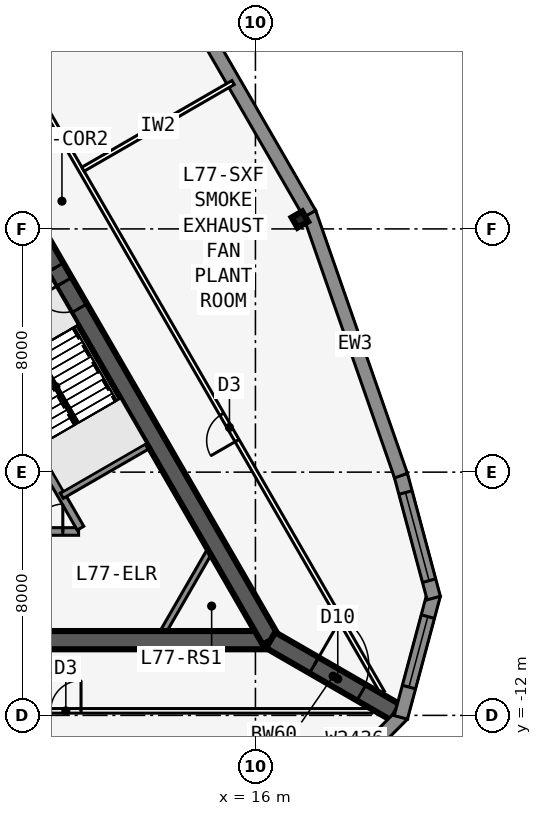
"""IFC4 building model, lengths in metres.
Left out: names, types, materials, properties, quantities, classifications, styles, units other than length and angle.
Written with IfcOpenShell. Run it as: python <this file> out.ifc"""

import sys

from ifc_helpers import new_model, si_unit, direction, frame, frame_2d, origin, origin_2d, place, context, subcontext, project, spatial, polyline, rectangle, i_section, outline, extrude, element, fill, save


model = new_model("IFC4")
c1 = context("Model", 3, precision=1e-05, world=origin(), true_north=direction((0.0, 1.0)))
c2 = subcontext(c1, "Body", "Model", "MODEL_VIEW")
j1 = project(units=[si_unit("LENGTHUNIT", "METRE"), si_unit("PLANEANGLEUNIT", "RADIAN")], contexts=[c1])
p1 = place(None, origin())
s1 = spatial("IfcSite", under=j1, at=p1, CompositionType="ELEMENT")
p2 = place(p1, origin())
s2 = spatial("IfcBuilding", under=s1, at=p2, CompositionType="ELEMENT")
p3 = place(p2, frame((0.0, 0.0, 297.8)))
s3 = spatial("IfcBuildingStorey", under=s2, at=p3, CompositionType="ELEMENT", Elevation=297.8)
p4 = place(p3, frame((-16.5, -9.526, 0.0), z_axis=(0.0, 0.0, 1.0), x_axis=(1.0, 0.0, 0.0)))
e1 = element("IfcWall", 1, at=p4, inside=s3, PredefinedType="SHEAR", context=c2, shape_type="SweptSolid", body=[
    extrude(rectangle(XDim=33.0, YDim=0.6, at=frame_2d((16.5, 0.0))), origin(), (0.0, 0.0, 1.0), 6.0),
])
p5 = place(p4, frame((14.05, 0.0, 0.0)))
e2 = element("IfcOpeningElement", 2, at=p5, cuts=e1, PredefinedType="OPENING", context=c2, shape_type="SweptSolid", body=[
    extrude(rectangle(XDim=1.8, YDim=2.13, at=frame_2d((0.9, 1.065))), frame((0.0, 0.31, 0.0), z_axis=(0.0, -1.0, 0.0), x_axis=(1.0, 0.0, 0.0)), (0.0, 0.0, 1.0), 0.62),
])
p6 = place(p3, frame((-0.55, -5.951, 0.0), z_axis=(0.0, 0.0, 1.0), x_axis=(1.0, 0.0, 0.0)))
e3 = element("IfcWall", 3, at=p6, inside=s3, PredefinedType="SOLIDWALL", context=c2, shape_type="SweptSolid", body=[
    extrude(rectangle(XDim=10.733, YDim=0.25, at=frame_2d((5.366, 0.0))), origin(), (0.0, 0.0, 1.0), 5.75),
])
p7 = place(p6, frame((9.314, 0.0, 0.0)))
e4 = element("IfcOpeningElement", 4, at=p7, cuts=e3, PredefinedType="OPENING", context=c2, shape_type="SweptSolid", body=[
    extrude(rectangle(XDim=0.9, YDim=2.13, at=frame_2d((0.45, 1.065))), frame((0.0, 0.135, 0.0), z_axis=(0.0, -1.0, 0.0), x_axis=(1.0, 0.0, 0.0)), (0.0, 0.0, 1.0), 0.27),
])
p8 = place(p6, frame((1.05, 0.0, 0.0)))
e5 = element("IfcOpeningElement", 5, at=p8, cuts=e3, PredefinedType="OPENING", context=c2, shape_type="SweptSolid", body=[
    extrude(rectangle(XDim=1.1, YDim=2.13, at=frame_2d((0.55, 1.065))), frame((0.0, 0.135, 0.0), z_axis=(0.0, -1.0, 0.0), x_axis=(1.0, 0.0, 0.0)), (0.0, 0.0, 1.0), 0.27),
])
p9 = place(p6, frame((4.05, 0.0, 0.0)))
e6 = element("IfcOpeningElement", 6, at=p9, cuts=e3, PredefinedType="OPENING", context=c2, shape_type="SweptSolid", body=[
    extrude(rectangle(XDim=1.1, YDim=2.13, at=frame_2d((0.55, 1.065))), frame((0.0, 0.135, 0.0), z_axis=(0.0, -1.0, 0.0), x_axis=(1.0, 0.0, 0.0)), (0.0, 0.0, 1.0), 0.27),
])
p10 = place(p3, frame((16.5, -9.526, 0.0), z_axis=(0.0, 0.0, 1.0), x_axis=(-0.499999749417, 0.866025548458, 0.0)))
e7 = element("IfcWall", 7, at=p10, inside=s3, PredefinedType="SHEAR", context=c2, shape_type="SweptSolid", body=[
    extrude(rectangle(XDim=33.0, YDim=0.6, at=frame_2d((16.5, 0.0))), origin(), (0.0, 0.0, 1.0), 6.0),
])
p11 = place(p10, frame((14.15, 0.0, 0.0)))
e8 = element("IfcOpeningElement", 8, at=p11, cuts=e7, PredefinedType="OPENING", context=c2, shape_type="SweptSolid", body=[
    extrude(rectangle(XDim=1.8, YDim=2.13, at=frame_2d((0.9, 1.065))), frame((0.0, 0.31, 0.0), z_axis=(0.0, -1.0, 0.0), x_axis=(1.0, 0.0, 0.0)), (0.0, 0.0, 1.0), 0.62),
])
p12 = place(p10, frame((12.6, 0.0, 0.0)))
e9 = element("IfcOpeningElement", 9, at=p12, cuts=e7, PredefinedType="OPENING", context=c2, shape_type="SweptSolid", body=[
    extrude(rectangle(XDim=1.0, YDim=2.13, at=frame_2d((0.5, 1.065))), frame((0.0, 0.31, 0.0), z_axis=(0.0, -1.0, 0.0), x_axis=(1.0, 0.0, 0.0)), (0.0, 0.0, 1.0), 0.62),
])
p13 = place(p3, frame((10.245, -5.843, 0.0), z_axis=(0.0, 0.0, 1.0), x_axis=(-0.499993009313, 0.866029439822, 0.0)))
e10 = element("IfcWall", 10, at=p13, inside=s3, PredefinedType="SOLIDWALL", context=c2, shape_type="SweptSolid", body=[
    extrude(rectangle(XDim=7.733, YDim=0.25, at=frame_2d((3.866, 0.0))), origin(), (0.0, 0.0, 1.0), 5.75),
])
p14 = place(p3, frame((9.629, -4.775, 0.0), z_axis=(0.0, 0.0, 1.0), x_axis=(0.865995643347, 0.500051543047, 0.0)))
e11 = element("IfcWall", 11, at=p14, inside=s3, PredefinedType="SOLIDWALL", context=c2, shape_type="SweptSolid", body=[
    extrude(rectangle(XDim=3.275, YDim=0.2, at=frame_2d((1.638, 0.0))), origin(), (0.0, 0.0, 1.0), 5.75),
])
p15 = place(p3, frame((16.5, -9.526, 0.0), z_axis=(0.0, 0.0, 1.0), x_axis=(0.866031398331, -0.499989616998, 0.0)))
e12 = element("IfcWall", 12, at=p15, inside=s3, PredefinedType="SHEAR", context=c2, shape_type="SweptSolid", body=[
    extrude(rectangle(XDim=4.746, YDim=0.6, at=frame_2d((2.373, 0.0))), origin(), (0.0, 0.0, 1.0), 6.0),
])
p16 = place(p15, frame((1.65, 0.0, 0.0)))
e13 = element("IfcOpeningElement", 13, at=p16, cuts=e12, PredefinedType="OPENING", context=c2, shape_type="SweptSolid", body=[
    extrude(rectangle(XDim=1.8, YDim=2.13, at=frame_2d((0.9, 1.065))), frame((0.0, 0.31, 0.0), z_axis=(0.0, -1.0, 0.0), x_axis=(1.0, 0.0, 0.0)), (0.0, 0.0, 1.0), 0.62),
])
p17 = place(p3, frame((17.461, 4.308, 0.0), z_axis=(0.0, 0.0, 1.0), x_axis=(0.866025403784, 0.5, 0.0)))
e14 = element("IfcColumn", 14, at=p17, inside=s3, PredefinedType="COLUMN", context=c2, shape_type="SweptSolid", body=[
    extrude(i_section(OverallWidth=0.399, OverallDepth=0.386, WebThickness=0.021, FlangeThickness=0.033, at=origin_2d()), origin(), (0.0, 0.0, 1.0), 6.0),
])
p18 = place(p3, frame((17.882, -14.924, 0.0), z_axis=(0.0, 0.0, 1.0), x_axis=(0.707106781187, 0.707106781187, 0.0)))
e15 = element("IfcWall", 15, at=p18, inside=s3, PredefinedType="SOLIDWALL", context=c2, shape_type="SweptSolid", body=[
    extrude(outline(polyline([(4.184, 0.225), (4.125, 0.225), (3.778, 0.132), (3.753, 0.225), (0.0, 0.225), (0.0, -0.225), (4.184, -0.225), (4.184, 0.225)])), origin(), (0.0, 0.0, 1.0), 5.75),
])
p19 = place(p18, frame((0.751, 0.0, 0.9)))
e16 = element("IfcOpeningElement", 16, at=p19, cuts=e15, PredefinedType="OPENING", context=c2, shape_type="SweptSolid", body=[
    extrude(rectangle(XDim=2.4, YDim=3.6, at=frame_2d((1.2, 1.8))), frame((0.0, 0.235, 0.0), z_axis=(0.0, -1.0, 0.0), x_axis=(1.0, 0.0, 0.0)), (0.0, 0.0, 1.0), 0.47),
])
p20 = place(p3, frame((20.783, -12.066, 0.0), z_axis=(0.0, 0.0, 1.0), x_axis=(0.258784695888, 0.965935029479, 0.0)))
e17 = element("IfcWall", 17, at=p20, inside=s3, PredefinedType="SOLIDWALL", context=c2, shape_type="SweptSolid", body=[
    extrude(outline(polyline([(4.184, 0.225), (0.431, 0.225), (0.406, 0.132), (0.06, 0.225), (0.0, 0.225), (0.0, -0.225), (4.184, -0.225), (4.184, 0.225)])), origin(), (0.0, 0.0, 1.0), 5.75),
])
p21 = place(p20, frame((1.033, 0.0, 0.9)))
e18 = element("IfcOpeningElement", 18, at=p21, cuts=e17, PredefinedType="OPENING", context=c2, shape_type="SweptSolid", body=[
    extrude(rectangle(XDim=2.4, YDim=3.6, at=frame_2d((1.2, 1.8))), frame((0.0, 0.235, 0.0), z_axis=(0.0, -1.0, 0.0), x_axis=(1.0, 0.0, 0.0)), (0.0, 0.0, 1.0), 0.47),
])
p22 = place(p3, frame((21.865, -8.141, 0.0), z_axis=(0.0, 0.0, 1.0), x_axis=(-0.258784695888, 0.965935029479, 0.0)))
e19 = element("IfcWall", 19, at=p22, inside=s3, PredefinedType="SOLIDWALL", context=c2, shape_type="SweptSolid", body=[
    extrude(rectangle(XDim=4.184, YDim=0.45, at=frame_2d((2.092, 0.0))), origin(), (0.0, 0.0, 1.0), 5.75),
])
p23 = place(p22, frame((0.592, 0.0, 0.9)))
e20 = element("IfcOpeningElement", 20, at=p23, cuts=e19, PredefinedType="OPENING", context=c2, shape_type="SweptSolid", body=[
    extrude(rectangle(XDim=3.0, YDim=3.6, at=frame_2d((1.5, 1.8))), frame((0.0, 0.235, 0.0), z_axis=(0.0, -1.0, 0.0), x_axis=(1.0, 0.0, 0.0)), (0.0, 0.0, 1.0), 0.47),
])
p24 = place(p3, frame((20.788, -4.116, 0.0), z_axis=(0.0, 0.0, 1.0), x_axis=(-0.329547852357, 0.944138873793, 0.0)))
e21 = element("IfcWall", 21, at=p24, inside=s3, PredefinedType="SOLIDWALL", context=c2, shape_type="SweptSolid", body=[
    extrude(outline(polyline([(0.0, 0.0), (9.161, 0.0), (9.161, 5.75), (0.0, 5.75), (0.0, 0.0)]), holes=[polyline([(6.831, 2.875), (6.754, 3.457), (6.529, 4.0), (6.171, 4.466), (5.706, 4.823), (5.163, 5.048), (4.581, 5.125), (3.998, 5.048), (3.456, 4.823), (2.99, 4.466), (2.632, 4.0), (2.407, 3.457), (2.331, 2.875), (2.407, 2.293), (2.632, 1.75), (2.99, 1.284), (3.456, 0.926), (3.998, 0.702), (4.581, 0.625), (5.163, 0.702), (5.706, 0.926), (6.171, 1.284), (6.529, 1.75), (6.754, 2.293), (6.831, 2.875)])]), frame((0.0, 0.225, 0.0), z_axis=(0.0, -1.0, 0.0), x_axis=(1.0, 0.0, 0.0)), (0.0, 0.0, 1.0), 0.45),
])
p25 = place(p3, frame((17.786, 4.495, 0.0), z_axis=(0.0, 0.0, 1.0), x_axis=(-0.500004234368, 0.866022959057, 0.0)))
e22 = element("IfcWall", 22, at=p25, inside=s3, PredefinedType="SOLIDWALL", context=c2, shape_type="SweptSolid", body=[
    extrude(outline(polyline([(0.0, 0.0), (10.0, 0.0), (10.0, 5.75), (0.0, 5.75), (0.0, 0.0)]), holes=[polyline([(7.25, 2.875), (7.173, 3.457), (6.948, 4.0), (6.591, 4.466), (6.125, 4.823), (5.582, 5.048), (5.0, 5.125), (4.417, 5.048), (3.875, 4.823), (3.409, 4.466), (3.052, 4.0), (2.827, 3.457), (2.75, 2.875), (2.827, 2.293), (3.052, 1.75), (3.409, 1.284), (3.875, 0.926), (4.417, 0.702), (5.0, 0.625), (5.582, 0.702), (6.125, 0.926), (6.591, 1.284), (6.948, 1.75), (7.173, 2.293), (7.25, 2.875)])]), frame((0.0, 0.225, 0.0), z_axis=(0.0, -1.0, 0.0), x_axis=(1.0, 0.0, 0.0)), (0.0, 0.0, 1.0), 0.45),
])
p26 = place(p3, frame((-19.827, -11.851, 0.0), z_axis=(0.0, 0.0, 1.0), x_axis=(1.0, 0.0, 0.0)))
e23 = element("IfcWall", 23, at=p26, inside=s3, PredefinedType="PARTITIONING", context=c2, shape_type="SweptSolid", body=[
    extrude(rectangle(XDim=39.654, YDim=0.15, at=frame_2d((19.827, 0.0))), origin(), (0.0, 0.0, 1.0), 5.75),
])
p27 = place(p26, frame((9.563, 0.0, 0.0)))
e24 = element("IfcOpeningElement", 24, at=p27, cuts=e23, PredefinedType="OPENING", context=c2, shape_type="SweptSolid", body=[
    extrude(rectangle(XDim=1.0, YDim=2.13, at=frame_2d((0.5, 1.065))), frame((0.0, 0.085, 0.0), z_axis=(0.0, -1.0, 0.0), x_axis=(1.0, 0.0, 0.0)), (0.0, 0.0, 1.0), 0.17),
])
p28 = place(p26, frame((29.091, 0.0, 0.0)))
e25 = element("IfcOpeningElement", 25, at=p28, cuts=e23, PredefinedType="OPENING", context=c2, shape_type="SweptSolid", body=[
    extrude(rectangle(XDim=1.0, YDim=2.13, at=frame_2d((0.5, 1.065))), frame((0.0, 0.085, 0.0), z_axis=(0.0, -1.0, 0.0), x_axis=(1.0, 0.0, 0.0)), (0.0, 0.0, 1.0), 0.17),
])
p29 = place(p3, frame((20.177, -11.245, 0.0), z_axis=(0.0, 0.0, 1.0), x_axis=(-0.499998875317, 0.866026053119, 0.0)))
e26 = element("IfcWall", 26, at=p29, inside=s3, PredefinedType="PARTITIONING", context=c2, shape_type="SweptSolid", body=[
    extrude(rectangle(XDim=39.654, YDim=0.15, at=frame_2d((19.827, 0.0))), origin(), (0.0, 0.0, 1.0), 5.75),
])
p30 = place(p29, frame((9.563, 0.0, 0.0)))
e27 = element("IfcOpeningElement", 27, at=p30, cuts=e26, PredefinedType="OPENING", context=c2, shape_type="SweptSolid", body=[
    extrude(rectangle(XDim=1.0, YDim=2.13, at=frame_2d((0.5, 1.065))), frame((0.0, 0.085, 0.0), z_axis=(0.0, -1.0, 0.0), x_axis=(1.0, 0.0, 0.0)), (0.0, 0.0, 1.0), 0.17),
])
p31 = place(p29, frame((29.091, 0.0, 0.0)))
e28 = element("IfcOpeningElement", 28, at=p31, cuts=e26, PredefinedType="OPENING", context=c2, shape_type="SweptSolid", body=[
    extrude(rectangle(XDim=1.0, YDim=2.13, at=frame_2d((0.5, 1.065))), frame((0.0, 0.085, 0.0), z_axis=(0.0, -1.0, 0.0), x_axis=(1.0, 0.0, 0.0)), (0.0, 0.0, 1.0), 0.17),
])
p32 = place(p3, frame((10.329, 5.963, 0.0), z_axis=(0.0, 0.0, 1.0), x_axis=(0.86601224135, 0.500022797313, 0.0)))
e29 = element("IfcWall", 29, at=p32, inside=s3, PredefinedType="PARTITIONING", context=c2, shape_type="SweptSolid", body=[
    extrude(rectangle(XDim=5.699, YDim=0.15, at=frame_2d((2.85, 0.0))), origin(), (0.0, 0.0, 1.0), 4.708),
])
p33 = place(p3, frame((14.479, -6.626, 0.0), z_axis=(0.0, 0.0, 1.0), x_axis=(-0.499952404951, -0.866052881055, 0.0)))
e30 = element("IfcWall", 30, at=p33, inside=s3, PredefinedType="SOLIDWALL", context=c2, shape_type="SweptSolid", body=[
    extrude(rectangle(XDim=3.002, YDim=0.2, at=frame_2d((1.501, 0.0))), origin(), (0.0, 0.0, 1.0), 5.75),
])
p34 = place(p3, frame((10.135, -2.401, 0.0), z_axis=(0.0, 0.0, 1.0), x_axis=(-0.499992232847, 0.866029888106, 0.0)))
e31 = element("IfcWall", 31, at=p34, inside=s3, PredefinedType="SOLIDWALL", context=c2, shape_type="SweptSolid", body=[
    extrude(rectangle(XDim=2.794, YDim=0.1, at=frame_2d((1.397, 0.0))), origin(), (0.0, 0.0, 1.0), 6.0),
])
p35 = place(p19, origin())
e32 = element("IfcWindow", 32, at=p35, inside=s3, PartitioningType="SINGLE_PANEL", PredefinedType="WINDOW", context=c2, shape_type="SweptSolid", body=[
    extrude(rectangle(XDim=2.4, YDim=3.6, at=frame_2d((1.2, 1.8))), frame((0.0, 0.03, 0.0), z_axis=(0.0, -1.0, 0.0), x_axis=(1.0, 0.0, 0.0)), (0.0, 0.0, 1.0), 0.06),
])
fill(e16, e32)
p36 = place(p21, origin())
e33 = element("IfcWindow", 33, at=p36, inside=s3, PartitioningType="SINGLE_PANEL", PredefinedType="WINDOW", context=c2, shape_type="SweptSolid", body=[
    extrude(rectangle(XDim=2.4, YDim=3.6, at=frame_2d((1.2, 1.8))), frame((0.0, 0.03, 0.0), z_axis=(0.0, -1.0, 0.0), x_axis=(1.0, 0.0, 0.0)), (0.0, 0.0, 1.0), 0.06),
])
fill(e18, e33)
p37 = place(p23, origin())
e34 = element("IfcWindow", 34, at=p37, inside=s3, PartitioningType="SINGLE_PANEL", PredefinedType="WINDOW", context=c2, shape_type="SweptSolid", body=[
    extrude(rectangle(XDim=3.0, YDim=3.6, at=frame_2d((1.5, 1.8))), frame((0.0, 0.03, 0.0), z_axis=(0.0, -1.0, 0.0), x_axis=(1.0, 0.0, 0.0)), (0.0, 0.0, 1.0), 0.06),
])
fill(e20, e34)
p38 = place(p28, origin())
e35 = element("IfcDoor", 35, at=p38, inside=s3, OperationType="SINGLE_SWING_RIGHT", PredefinedType="DOOR", context=c2, shape_type="SweptSolid", body=[
    extrude(rectangle(XDim=1.0, YDim=2.13, at=frame_2d((0.5, 1.065))), frame((0.0, 0.025, 0.0), z_axis=(0.0, -1.0, 0.0), x_axis=(1.0, 0.0, 0.0)), (0.0, 0.0, 1.0), 0.05),
])
fill(e25, e35)
p39 = place(p30, origin())
e36 = element("IfcDoor", 36, at=p39, inside=s3, OperationType="SINGLE_SWING_LEFT", PredefinedType="DOOR", context=c2, shape_type="SweptSolid", body=[
    extrude(rectangle(XDim=1.0, YDim=2.13, at=frame_2d((0.5, 1.065))), frame((0.0, 0.025, 0.0), z_axis=(0.0, -1.0, 0.0), x_axis=(1.0, 0.0, 0.0)), (0.0, 0.0, 1.0), 0.05),
])
fill(e27, e36)
p40 = place(p11, origin())
e37 = element("IfcDoor", 37, at=p40, inside=s3, OperationType="DOUBLE_DOOR_SINGLE_SWING", PredefinedType="DOOR", context=c2, shape_type="SweptSolid", body=[
    extrude(rectangle(XDim=1.8, YDim=2.13, at=frame_2d((0.9, 1.065))), frame((0.0, 0.025, 0.0), z_axis=(0.0, -1.0, 0.0), x_axis=(1.0, 0.0, 0.0)), (0.0, 0.0, 1.0), 0.05),
])
fill(e8, e37)
p41 = place(p12, origin())
e38 = element("IfcDoor", 38, at=p41, inside=s3, OperationType="SINGLE_SWING_RIGHT", PredefinedType="DOOR", context=c2, shape_type="SweptSolid", body=[
    extrude(rectangle(XDim=1.0, YDim=2.13, at=frame_2d((0.5, 1.065))), frame((0.0, 0.025, 0.0), z_axis=(0.0, -1.0, 0.0), x_axis=(1.0, 0.0, 0.0)), (0.0, 0.0, 1.0), 0.05),
])
fill(e9, e38)
p42 = place(p16, origin())
e39 = element("IfcDoor", 39, at=p42, inside=s3, OperationType="DOUBLE_DOOR_DOUBLE_SWING", PredefinedType="DOOR", context=c2, shape_type="SweptSolid", body=[
    extrude(rectangle(XDim=1.8, YDim=2.13, at=frame_2d((0.9, 1.065))), frame((0.0, 0.025, 0.0), z_axis=(0.0, -1.0, 0.0), x_axis=(1.0, 0.0, 0.0)), (0.0, 0.0, 1.0), 0.05),
])
fill(e13, e39)
p43 = place(p7, origin())
e40 = element("IfcDoor", 40, at=p43, inside=s3, OperationType="SINGLE_SWING_RIGHT", PredefinedType="DOOR", context=c2, shape_type="SweptSolid", body=[
    extrude(rectangle(XDim=0.9, YDim=2.13, at=frame_2d((0.45, 1.065))), frame((0.0, 0.025, 0.0), z_axis=(0.0, -1.0, 0.0), x_axis=(1.0, 0.0, 0.0)), (0.0, 0.0, 1.0), 0.05),
])
fill(e4, e40)
save(model, sys.argv[1])
